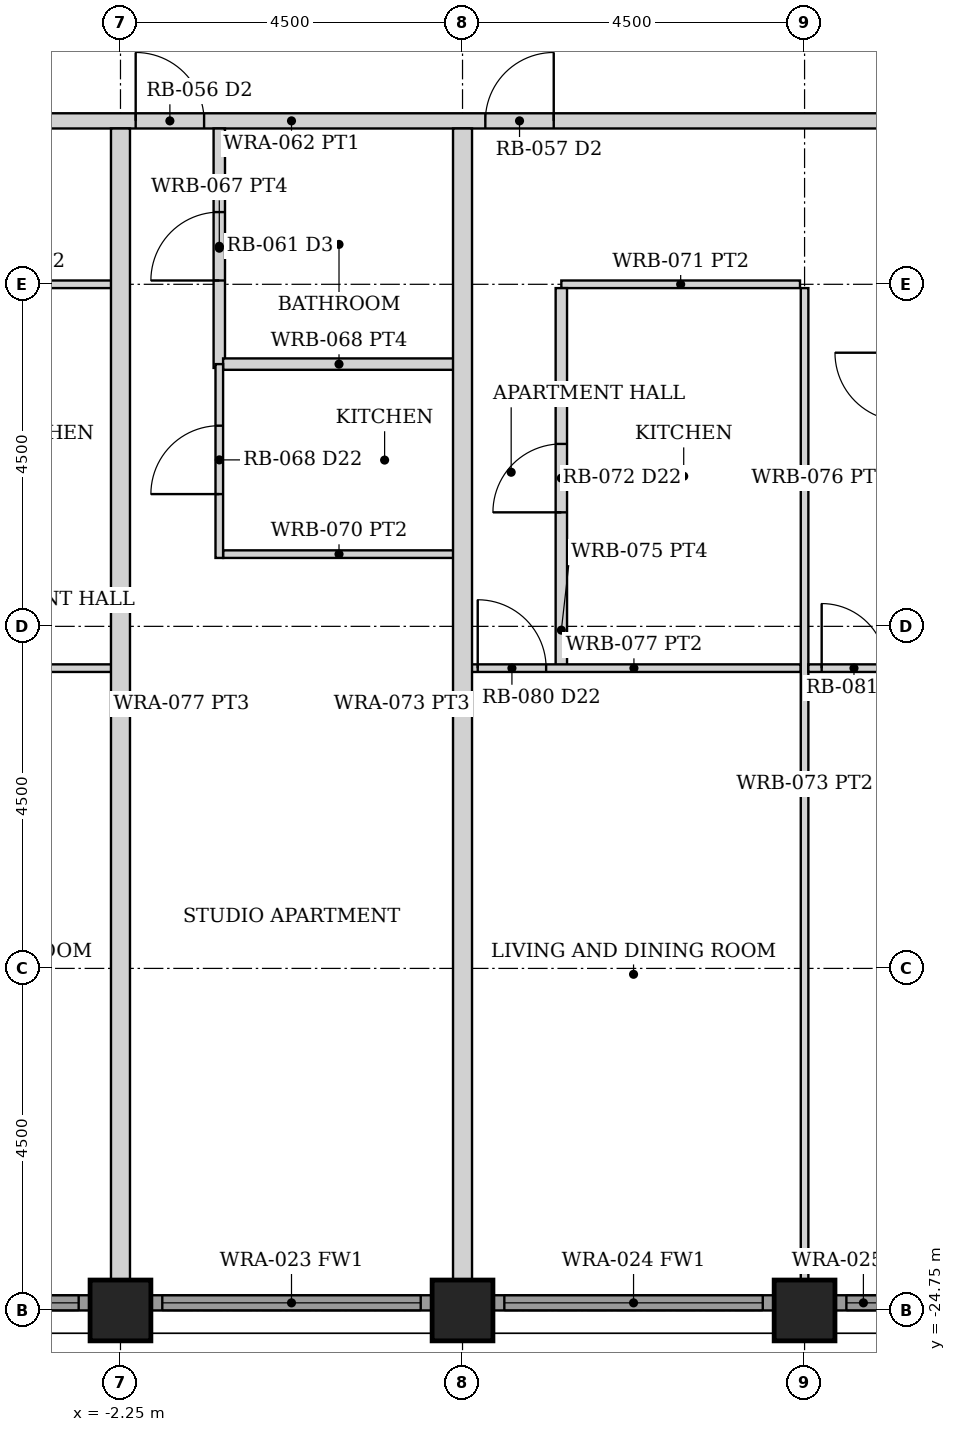
"""IFC4 building model, lengths in metres.
Left out: names, types, materials, properties, quantities, classifications, styles, units other than length and angle.
Written with IfcOpenShell. Run it as: python <this file> out.ifc"""

import sys

from ifc_helpers import new_model, si_unit, direction, frame, frame_2d, origin, origin_2d, place, context, subcontext, project, spatial, rectangle, hollow_rectangle, extrude, element, fill, save


model = new_model("IFC4")
c1 = context("Model", 3, precision=1e-05, world=origin(), true_north=direction((0.0, 1.0)))
c2 = subcontext(c1, "Body", "Model", "MODEL_VIEW")
j1 = project(units=[si_unit("LENGTHUNIT", "METRE"), si_unit("PLANEANGLEUNIT", "RADIAN")], contexts=[c1])
p1 = place(None, origin())
s1 = spatial("IfcSite", under=j1, at=p1, CompositionType="ELEMENT")
p2 = place(p1, origin())
s2 = spatial("IfcBuilding", under=s1, at=p2, CompositionType="ELEMENT")
p3 = place(p2, frame((0.0, 0.0, 37.0)))
s3 = spatial("IfcBuildingStorey", under=s2, at=p3, CompositionType="ELEMENT", Elevation=37.0)
for number, where, z_axis, x_axis in (
    (1, (-2.25, -24.75, 0.0), (0.0, 0.0, 1.0), (0.0, 1.0, 0.0)),
    (2, (2.25, -24.75, 0.0), (0.0, 0.0, 1.0), (0.0, 1.0, 0.0)),
    (3, (6.75, -24.75, 0.0), (0.0, 0.0, 1.0), (0.0, 1.0, 0.0)),
):
    element("IfcColumn", number, at=place(p3, frame(where, z_axis=z_axis, x_axis=x_axis)), inside=s3, PredefinedType="COLUMN", context=c2, shape_type="SweptSolid", body=[
        extrude(hollow_rectangle(XDim=0.8, YDim=0.8, WallThickness=0.07, at=origin_2d()), origin(), (0.0, 0.0, 1.0), 3.5),
    ])
p4 = place(p3, frame((-6.345, -24.65, 0.0), z_axis=(0.0, 0.0, 1.0), x_axis=(1.0, 0.0, 0.0)))
e4 = element("IfcWall", 4, at=p4, inside=s3, PredefinedType="SOLIDWALL", context=c2, shape_type="SweptSolid", body=[
    extrude(rectangle(XDim=3.69, YDim=0.2, at=frame_2d((1.845, 0.0))), origin(), (0.0, 0.0, 1.0), 2.379),
])
p5 = place(p4, frame((0.145, 0.0, 0.3)))
e5 = element("IfcOpeningElement", 5, at=p5, cuts=e4, PredefinedType="OPENING", context=c2, shape_type="SweptSolid", body=[
    extrude(rectangle(XDim=3.4, YDim=1.929, at=frame_2d((1.7, 0.964))), frame((0.0, 0.11, 0.0), z_axis=(0.0, -1.0, 0.0), x_axis=(1.0, 0.0, 0.0)), (0.0, 0.0, 1.0), 0.22),
])
p6 = place(p3, frame((-1.845, -24.65, 0.0), z_axis=(0.0, 0.0, 1.0), x_axis=(1.0, 0.0, 0.0)))
e6 = element("IfcWall", 6, at=p6, inside=s3, PredefinedType="SOLIDWALL", context=c2, shape_type="SweptSolid", body=[
    extrude(rectangle(XDim=3.69, YDim=0.2, at=frame_2d((1.845, 0.0))), origin(), (0.0, 0.0, 1.0), 2.379),
])
p7 = place(p6, frame((0.145, 0.0, 0.3)))
e7 = element("IfcOpeningElement", 7, at=p7, cuts=e6, PredefinedType="OPENING", context=c2, shape_type="SweptSolid", body=[
    extrude(rectangle(XDim=3.4, YDim=1.929, at=frame_2d((1.7, 0.964))), frame((0.0, 0.11, 0.0), z_axis=(0.0, -1.0, 0.0), x_axis=(1.0, 0.0, 0.0)), (0.0, 0.0, 1.0), 0.22),
])
p8 = place(p3, frame((2.655, -24.65, 0.0), z_axis=(0.0, 0.0, 1.0), x_axis=(1.0, 0.0, 0.0)))
e8 = element("IfcWall", 8, at=p8, inside=s3, PredefinedType="SOLIDWALL", context=c2, shape_type="SweptSolid", body=[
    extrude(rectangle(XDim=3.69, YDim=0.2, at=frame_2d((1.845, 0.0))), origin(), (0.0, 0.0, 1.0), 2.379),
])
p9 = place(p8, frame((0.145, 0.0, 0.3)))
e9 = element("IfcOpeningElement", 9, at=p9, cuts=e8, PredefinedType="OPENING", context=c2, shape_type="SweptSolid", body=[
    extrude(rectangle(XDim=3.4, YDim=1.929, at=frame_2d((1.7, 0.964))), frame((0.0, 0.11, 0.0), z_axis=(0.0, -1.0, 0.0), x_axis=(1.0, 0.0, 0.0)), (0.0, 0.0, 1.0), 0.22),
])
p10 = place(p3, frame((7.155, -24.65, 0.0), z_axis=(0.0, 0.0, 1.0), x_axis=(1.0, 0.0, 0.0)))
e10 = element("IfcWall", 10, at=p10, inside=s3, PredefinedType="SOLIDWALL", context=c2, shape_type="SweptSolid", body=[
    extrude(rectangle(XDim=3.69, YDim=0.2, at=frame_2d((1.845, 0.0))), origin(), (0.0, 0.0, 1.0), 2.379),
])
p11 = place(p10, frame((0.145, 0.0, 0.3)))
e11 = element("IfcOpeningElement", 11, at=p11, cuts=e10, PredefinedType="OPENING", context=c2, shape_type="SweptSolid", body=[
    extrude(rectangle(XDim=3.4, YDim=1.929, at=frame_2d((1.7, 0.964))), frame((0.0, 0.11, 0.0), z_axis=(0.0, -1.0, 0.0), x_axis=(1.0, 0.0, 0.0)), (0.0, 0.0, 1.0), 0.22),
])
p12 = place(p3, frame((-24.55, -9.1, 0.0), z_axis=(0.0, 0.0, 1.0), x_axis=(1.0, 0.0, 0.0)))
e12 = element("IfcWall", 12, at=p12, inside=s3, PredefinedType="PARTITIONING", context=c2, shape_type="SweptSolid", body=[
    extrude(rectangle(XDim=49.1, YDim=0.2, at=frame_2d((24.55, 0.0))), origin(), (0.0, 0.0, 1.0), 2.373),
])
p13 = place(p12, frame((5.1, 0.0, 0.0)))
e13 = element("IfcOpeningElement", 13, at=p13, cuts=e12, PredefinedType="OPENING", context=c2, shape_type="SweptSolid", body=[
    extrude(rectangle(XDim=0.9, YDim=2.1, at=frame_2d((0.45, 1.05))), frame((0.0, 0.11, 0.0), z_axis=(0.0, -1.0, 0.0), x_axis=(1.0, 0.0, 0.0)), (0.0, 0.0, 1.0), 0.22),
])
p14 = place(p12, frame((9.0, 0.0, 0.0)))
e14 = element("IfcOpeningElement", 14, at=p14, cuts=e12, PredefinedType="OPENING", context=c2, shape_type="SweptSolid", body=[
    extrude(rectangle(XDim=0.9, YDim=2.1, at=frame_2d((0.45, 1.05))), frame((0.0, 0.11, 0.0), z_axis=(0.0, -1.0, 0.0), x_axis=(1.0, 0.0, 0.0)), (0.0, 0.0, 1.0), 0.22),
])
p15 = place(p12, frame((18.1, 0.0, 0.0)))
e15 = element("IfcOpeningElement", 15, at=p15, cuts=e12, PredefinedType="OPENING", context=c2, shape_type="SweptSolid", body=[
    extrude(rectangle(XDim=0.9, YDim=2.1, at=frame_2d((0.45, 1.05))), frame((0.0, 0.11, 0.0), z_axis=(0.0, -1.0, 0.0), x_axis=(1.0, 0.0, 0.0)), (0.0, 0.0, 1.0), 0.22),
])
p16 = place(p12, frame((22.5, 0.0, 0.0)))
e16 = element("IfcOpeningElement", 16, at=p16, cuts=e12, PredefinedType="OPENING", context=c2, shape_type="SweptSolid", body=[
    extrude(rectangle(XDim=0.9, YDim=2.1, at=frame_2d((0.45, 1.05))), frame((0.0, 0.11, 0.0), z_axis=(0.0, -1.0, 0.0), x_axis=(1.0, 0.0, 0.0)), (0.0, 0.0, 1.0), 0.22),
])
p17 = place(p12, frame((27.1, 0.0, 0.0)))
e17 = element("IfcOpeningElement", 17, at=p17, cuts=e12, PredefinedType="OPENING", context=c2, shape_type="SweptSolid", body=[
    extrude(rectangle(XDim=0.9, YDim=2.1, at=frame_2d((0.45, 1.05))), frame((0.0, 0.11, 0.0), z_axis=(0.0, -1.0, 0.0), x_axis=(1.0, 0.0, 0.0)), (0.0, 0.0, 1.0), 0.22),
])
p18 = place(p12, frame((36.0, 0.0, 0.0)))
e18 = element("IfcOpeningElement", 18, at=p18, cuts=e12, PredefinedType="OPENING", context=c2, shape_type="SweptSolid", body=[
    extrude(rectangle(XDim=0.9, YDim=2.1, at=frame_2d((0.45, 1.05))), frame((0.0, 0.11, 0.0), z_axis=(0.0, -1.0, 0.0), x_axis=(1.0, 0.0, 0.0)), (0.0, 0.0, 1.0), 0.22),
])
p19 = place(p12, frame((43.1, 0.0, 0.0)))
e19 = element("IfcOpeningElement", 19, at=p19, cuts=e12, PredefinedType="OPENING", context=c2, shape_type="SweptSolid", body=[
    extrude(rectangle(XDim=0.9, YDim=2.1, at=frame_2d((0.45, 1.05))), frame((0.0, 0.11, 0.0), z_axis=(0.0, -1.0, 0.0), x_axis=(1.0, 0.0, 0.0)), (0.0, 0.0, 1.0), 0.22),
])
p20 = place(p3, frame((-5.45, -11.25, 0.0), z_axis=(0.0, 0.0, 1.0), x_axis=(1.0, 0.0, 0.0)))
e20 = element("IfcWall", 20, at=p20, inside=s3, PredefinedType="PARTITIONING", context=c2, shape_type="SweptSolid", body=[
    extrude(rectangle(XDim=3.14, YDim=0.1, at=frame_2d((1.57, 0.0))), origin(), (0.0, 0.0, 1.0), 2.373),
])
p21 = place(p3, frame((-6.7, -16.3, 0.0), z_axis=(0.0, 0.0, 1.0), x_axis=(1.0, 0.0, 0.0)))
e21 = element("IfcWall", 21, at=p21, inside=s3, PredefinedType="PARTITIONING", context=c2, shape_type="SweptSolid", body=[
    extrude(rectangle(XDim=4.39, YDim=0.1, at=frame_2d((2.195, 0.0))), origin(), (0.0, 0.0, 1.0), 2.373),
])
p22 = place(p21, frame((0.15, 0.0, 0.0)))
e22 = element("IfcOpeningElement", 22, at=p22, cuts=e21, PredefinedType="OPENING", context=c2, shape_type="SweptSolid", body=[
    extrude(rectangle(XDim=0.9, YDim=2.1, at=frame_2d((0.45, 1.05))), frame((0.0, 0.06, 0.0), z_axis=(0.0, -1.0, 0.0), x_axis=(1.0, 0.0, 0.0)), (0.0, 0.0, 1.0), 0.12),
])
p23 = place(p3, frame((-0.95, -12.35, 0.0), z_axis=(0.0, 0.0, 1.0), x_axis=(0.0, 1.0, 0.0)))
e23 = element("IfcWall", 23, at=p23, inside=s3, PredefinedType="PARTITIONING", context=c2, shape_type="SweptSolid", body=[
    extrude(rectangle(XDim=3.15, YDim=0.15, at=frame_2d((1.575, 0.0))), origin(), (0.0, 0.0, 1.0), 2.373),
])
p24 = place(p23, frame((1.15, 0.0, 0.0)))
e24 = element("IfcOpeningElement", 24, at=p24, cuts=e23, PredefinedType="OPENING", context=c2, shape_type="SweptSolid", body=[
    extrude(rectangle(XDim=0.9, YDim=2.1, at=frame_2d((0.45, 1.05))), frame((0.0, 0.085, 0.0), z_axis=(0.0, -1.0, 0.0), x_axis=(1.0, 0.0, 0.0)), (0.0, 0.0, 1.0), 0.17),
])
p25 = place(p3, frame((-0.9, -12.3, 0.0), z_axis=(0.0, 0.0, 1.0), x_axis=(1.0, 0.0, 0.0)))
e25 = element("IfcWall", 25, at=p25, inside=s3, PredefinedType="PARTITIONING", context=c2, shape_type="SweptSolid", body=[
    extrude(rectangle(XDim=3.05, YDim=0.15, at=frame_2d((1.525, 0.0))), origin(), (0.0, 0.0, 1.0), 2.373),
])
p26 = place(p3, frame((-0.9, -14.8, 0.0), z_axis=(0.0, 0.0, 1.0), x_axis=(1.0, 0.0, 0.0)))
e26 = element("IfcWall", 26, at=p26, inside=s3, PredefinedType="PARTITIONING", context=c2, shape_type="SweptSolid", body=[
    extrude(rectangle(XDim=3.05, YDim=0.1, at=frame_2d((1.525, 0.0))), origin(), (0.0, 0.0, 1.0), 2.373),
])
p27 = place(p3, frame((-0.95, -14.85, 0.0), z_axis=(0.0, 0.0, 1.0), x_axis=(0.0, 1.0, 0.0)))
e27 = element("IfcWall", 27, at=p27, inside=s3, PredefinedType="PARTITIONING", context=c2, shape_type="SweptSolid", body=[
    extrude(rectangle(XDim=2.55, YDim=0.1, at=frame_2d((1.275, 0.0))), origin(), (0.0, 0.0, 1.0), 2.373),
])
p28 = place(p27, frame((0.84, 0.0, 0.0)))
e28 = element("IfcOpeningElement", 28, at=p28, cuts=e27, PredefinedType="OPENING", context=c2, shape_type="SweptSolid", body=[
    extrude(rectangle(XDim=0.9, YDim=2.1, at=frame_2d((0.45, 1.05))), frame((0.0, 0.06, 0.0), z_axis=(0.0, -1.0, 0.0), x_axis=(1.0, 0.0, 0.0)), (0.0, 0.0, 1.0), 0.12),
])
p29 = place(p3, frame((3.55, -11.25, 0.0), z_axis=(0.0, 0.0, 1.0), x_axis=(1.0, 0.0, 0.0)))
e29 = element("IfcWall", 29, at=p29, inside=s3, PredefinedType="PARTITIONING", context=c2, shape_type="SweptSolid", body=[
    extrude(rectangle(XDim=3.14, YDim=0.1, at=frame_2d((1.57, 0.0))), origin(), (0.0, 0.0, 1.0), 2.373),
])
p30 = place(p3, frame((3.55, -16.3, 0.0), z_axis=(0.0, 0.0, 1.0), x_axis=(0.0, 1.0, 0.0)))
e30 = element("IfcWall", 30, at=p30, inside=s3, PredefinedType="PARTITIONING", context=c2, shape_type="SweptSolid", body=[
    extrude(rectangle(XDim=5.0, YDim=0.15, at=frame_2d((2.5, 0.0))), origin(), (0.0, 0.0, 1.0), 2.373),
])
p31 = place(p30, frame((2.05, 0.0, 0.0)))
e31 = element("IfcOpeningElement", 31, at=p31, cuts=e30, PredefinedType="OPENING", context=c2, shape_type="SweptSolid", body=[
    extrude(rectangle(XDim=0.9, YDim=2.1, at=frame_2d((0.45, 1.05))), frame((0.0, 0.085, 0.0), z_axis=(0.0, -1.0, 0.0), x_axis=(1.0, 0.0, 0.0)), (0.0, 0.0, 1.0), 0.17),
])
p32 = place(p3, frame((2.31, -16.3, 0.0), z_axis=(0.0, 0.0, 1.0), x_axis=(1.0, 0.0, 0.0)))
e32 = element("IfcWall", 32, at=p32, inside=s3, PredefinedType="PARTITIONING", context=c2, shape_type="SweptSolid", body=[
    extrude(rectangle(XDim=4.39, YDim=0.1, at=frame_2d((2.195, 0.0))), origin(), (0.0, 0.0, 1.0), 2.373),
])
p33 = place(p32, frame((0.14, 0.0, 0.0)))
e33 = element("IfcOpeningElement", 33, at=p33, cuts=e32, PredefinedType="OPENING", context=c2, shape_type="SweptSolid", body=[
    extrude(rectangle(XDim=0.9, YDim=2.1, at=frame_2d((0.45, 1.05))), frame((0.0, 0.06, 0.0), z_axis=(0.0, -1.0, 0.0), x_axis=(1.0, 0.0, 0.0)), (0.0, 0.0, 1.0), 0.12),
])
p34 = place(p3, frame((6.75, -24.35, 0.0), z_axis=(0.0, 0.0, 1.0), x_axis=(0.0, 1.0, 0.0)))
e34 = element("IfcWall", 34, at=p34, inside=s3, PredefinedType="PARTITIONING", context=c2, shape_type="SweptSolid", body=[
    extrude(rectangle(XDim=13.05, YDim=0.1, at=frame_2d((6.525, 0.0))), origin(), (0.0, 0.0, 1.0), 2.373),
])
p35 = place(p3, frame((6.8, -16.3, 0.0), z_axis=(0.0, 0.0, 1.0), x_axis=(1.0, 0.0, 0.0)))
e35 = element("IfcWall", 35, at=p35, inside=s3, PredefinedType="PARTITIONING", context=c2, shape_type="SweptSolid", body=[
    extrude(rectangle(XDim=4.39, YDim=0.1, at=frame_2d((2.195, 0.0))), origin(), (0.0, 0.0, 1.0), 2.373),
])
p36 = place(p35, frame((0.175, 0.0, 0.0)))
e36 = element("IfcOpeningElement", 36, at=p36, cuts=e35, PredefinedType="OPENING", context=c2, shape_type="SweptSolid", body=[
    extrude(rectangle(XDim=0.85, YDim=2.1, at=frame_2d((0.425, 1.05))), frame((0.0, 0.06, 0.0), z_axis=(0.0, -1.0, 0.0), x_axis=(1.0, 0.0, 0.0)), (0.0, 0.0, 1.0), 0.12),
])
p37 = place(p35, frame((2.46, 0.0, 0.0)))
e37 = element("IfcOpeningElement", 37, at=p37, cuts=e35, PredefinedType="OPENING", context=c2, shape_type="SweptSolid", body=[
    extrude(rectangle(XDim=0.8, YDim=2.1, at=frame_2d((0.4, 1.05))), frame((0.0, 0.06, 0.0), z_axis=(0.0, -1.0, 0.0), x_axis=(1.0, 0.0, 0.0)), (0.0, 0.0, 1.0), 0.12),
])
for number, where, z_axis, x_axis in (
    (38, (-2.25, -24.35, 0.0), (0.0, 0.0, 1.0), (0.0, 1.0, 0.0)),
    (39, (2.25, -24.35, 0.0), (0.0, 0.0, 1.0), (0.0, 1.0, 0.0)),
):
    element("IfcWall", number, at=place(p3, frame(where, z_axis=z_axis, x_axis=x_axis)), inside=s3, PredefinedType="PARTITIONING", context=c2, shape_type="SweptSolid", body=[
        extrude(rectangle(XDim=15.15, YDim=0.25, at=frame_2d((7.575, 0.0))), origin(), (0.0, 0.0, 1.0), 2.373),
    ])
p38 = place(p5, origin())
e40 = element("IfcWindow", 40, at=p38, inside=s3, PartitioningType="SINGLE_PANEL", PredefinedType="WINDOW", context=c2, shape_type="SweptSolid", body=[
    extrude(rectangle(XDim=3.4, YDim=1.929, at=frame_2d((1.7, 0.964))), frame((0.0, 0.03, 0.0), z_axis=(0.0, -1.0, 0.0), x_axis=(1.0, 0.0, 0.0)), (0.0, 0.0, 1.0), 0.06),
])
fill(e5, e40)
p39 = place(p7, origin())
e41 = element("IfcWindow", 41, at=p39, inside=s3, PartitioningType="SINGLE_PANEL", PredefinedType="WINDOW", context=c2, shape_type="SweptSolid", body=[
    extrude(rectangle(XDim=3.4, YDim=1.929, at=frame_2d((1.7, 0.964))), frame((0.0, 0.03, 0.0), z_axis=(0.0, -1.0, 0.0), x_axis=(1.0, 0.0, 0.0)), (0.0, 0.0, 1.0), 0.06),
])
fill(e7, e41)
p40 = place(p9, origin())
e42 = element("IfcWindow", 42, at=p40, inside=s3, PartitioningType="SINGLE_PANEL", PredefinedType="WINDOW", context=c2, shape_type="SweptSolid", body=[
    extrude(rectangle(XDim=3.4, YDim=1.929, at=frame_2d((1.7, 0.964))), frame((0.0, 0.03, 0.0), z_axis=(0.0, -1.0, 0.0), x_axis=(1.0, 0.0, 0.0)), (0.0, 0.0, 1.0), 0.06),
])
fill(e9, e42)
p41 = place(p11, origin())
e43 = element("IfcWindow", 43, at=p41, inside=s3, PartitioningType="SINGLE_PANEL", PredefinedType="WINDOW", context=c2, shape_type="SweptSolid", body=[
    extrude(rectangle(XDim=3.4, YDim=1.929, at=frame_2d((1.7, 0.964))), frame((0.0, 0.03, 0.0), z_axis=(0.0, -1.0, 0.0), x_axis=(1.0, 0.0, 0.0)), (0.0, 0.0, 1.0), 0.06),
])
fill(e11, e43)
p42 = place(p16, origin())
e44 = element("IfcDoor", 44, at=p42, inside=s3, OperationType="SINGLE_SWING_LEFT", PredefinedType="DOOR", context=c2, shape_type="SweptSolid", body=[
    extrude(rectangle(XDim=0.9, YDim=2.1, at=frame_2d((0.45, 1.05))), frame((0.0, 0.025, 0.0), z_axis=(0.0, -1.0, 0.0), x_axis=(1.0, 0.0, 0.0)), (0.0, 0.0, 1.0), 0.05),
])
fill(e16, e44)
p43 = place(p24, origin())
e45 = element("IfcDoor", 45, at=p43, inside=s3, OperationType="SINGLE_SWING_LEFT", PredefinedType="DOOR", context=c2, shape_type="SweptSolid", body=[
    extrude(rectangle(XDim=0.9, YDim=2.1, at=frame_2d((0.45, 1.05))), frame((0.0, 0.025, 0.0), z_axis=(0.0, -1.0, 0.0), x_axis=(1.0, 0.0, 0.0)), (0.0, 0.0, 1.0), 0.05),
])
fill(e24, e45)
p44 = place(p28, origin())
e46 = element("IfcDoor", 46, at=p44, inside=s3, OperationType="SINGLE_SWING_LEFT", PredefinedType="DOOR", context=c2, shape_type="SweptSolid", body=[
    extrude(rectangle(XDim=0.9, YDim=2.1, at=frame_2d((0.45, 1.05))), frame((0.0, 0.025, 0.0), z_axis=(0.0, -1.0, 0.0), x_axis=(1.0, 0.0, 0.0)), (0.0, 0.0, 1.0), 0.05),
])
fill(e28, e46)
p45 = place(p17, origin())
e47 = element("IfcDoor", 47, at=p45, inside=s3, OperationType="SINGLE_SWING_RIGHT", PredefinedType="DOOR", context=c2, shape_type="SweptSolid", body=[
    extrude(rectangle(XDim=0.9, YDim=2.1, at=frame_2d((0.45, 1.05))), frame((0.0, 0.025, 0.0), z_axis=(0.0, -1.0, 0.0), x_axis=(1.0, 0.0, 0.0)), (0.0, 0.0, 1.0), 0.05),
])
fill(e17, e47)
p46 = place(p31, origin())
e48 = element("IfcDoor", 48, at=p46, inside=s3, OperationType="SINGLE_SWING_LEFT", PredefinedType="DOOR", context=c2, shape_type="SweptSolid", body=[
    extrude(rectangle(XDim=0.9, YDim=2.1, at=frame_2d((0.45, 1.05))), frame((0.0, 0.025, 0.0), z_axis=(0.0, -1.0, 0.0), x_axis=(1.0, 0.0, 0.0)), (0.0, 0.0, 1.0), 0.05),
])
fill(e31, e48)
p47 = place(p33, origin())
e49 = element("IfcDoor", 49, at=p47, inside=s3, OperationType="SINGLE_SWING_LEFT", PredefinedType="DOOR", context=c2, shape_type="SweptSolid", body=[
    extrude(rectangle(XDim=0.9, YDim=2.1, at=frame_2d((0.45, 1.05))), frame((0.0, 0.025, 0.0), z_axis=(0.0, -1.0, 0.0), x_axis=(1.0, 0.0, 0.0)), (0.0, 0.0, 1.0), 0.05),
])
fill(e33, e49)
p48 = place(p36, origin())
e50 = element("IfcDoor", 50, at=p48, inside=s3, OperationType="SINGLE_SWING_LEFT", PredefinedType="DOOR", context=c2, shape_type="SweptSolid", body=[
    extrude(rectangle(XDim=0.85, YDim=2.1, at=frame_2d((0.425, 1.05))), frame((0.0, 0.025, 0.0), z_axis=(0.0, -1.0, 0.0), x_axis=(1.0, 0.0, 0.0)), (0.0, 0.0, 1.0), 0.05),
])
fill(e36, e50)
save(model, sys.argv[1])
